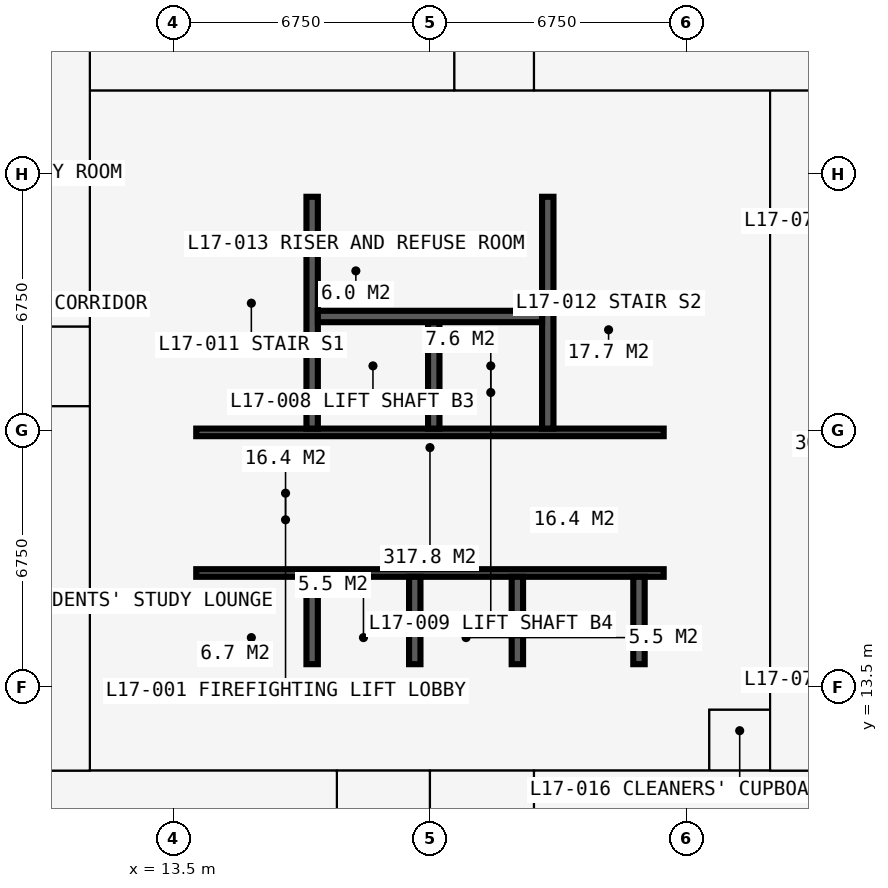
"""IFC4 building model, lengths in metres.
Left out: names, types, materials, properties, quantities, classifications, styles, units other than length and angle.
Written with IfcOpenShell. Run it as: python <this file> out.ifc"""

import sys

from ifc_helpers import new_model, si_unit, direction, frame, frame_2d, origin, place, context, subcontext, project, spatial, rectangle, extrude, element, fill, save


model = new_model("IFC4")
c1 = context("Model", 3, precision=1e-05, world=origin(), true_north=direction((0.0, 1.0)))
c2 = subcontext(c1, "Body", "Model", "MODEL_VIEW")
j1 = project(units=[si_unit("LENGTHUNIT", "METRE"), si_unit("PLANEANGLEUNIT", "RADIAN")], contexts=[c1])
p1 = place(None, origin())
s1 = spatial("IfcSite", under=j1, at=p1, CompositionType="ELEMENT")
p2 = place(p1, origin())
s2 = spatial("IfcBuilding", under=s1, at=p2, CompositionType="ELEMENT")
p3 = place(p2, frame((0.0, 0.0, 64.8)))
s3 = spatial("IfcBuildingStorey", under=s2, at=p3, CompositionType="ELEMENT", Elevation=64.8)
p4 = place(p3, frame((12.9, 13.5, 0.0), z_axis=(0.0, 0.0, 1.0), x_axis=(1.0, 0.0, 0.0)))
e1 = element("IfcWall", 1, at=p4, inside=s3, PredefinedType="SHEAR", context=c2, shape_type="SweptSolid", body=[
    extrude(rectangle(XDim=14.7, YDim=1.2, at=frame_2d((7.35, 0.0))), origin(), (0.0, 0.0, 1.0), 3.6),
])
p5 = place(p3, frame((27.0, 14.1, 0.0), z_axis=(0.0, 0.0, 1.0), x_axis=(0.0, 1.0, 0.0)))
e2 = element("IfcWall", 2, at=p5, inside=s3, PredefinedType="SHEAR", context=c2, shape_type="SweptSolid", body=[
    extrude(rectangle(XDim=12.3, YDim=1.2, at=frame_2d((6.15, 0.0))), origin(), (0.0, 0.0, 1.0), 3.6),
])
p6 = place(p5, frame((3.65, 0.0, 0.0)))
e3 = element("IfcOpeningElement", 3, at=p6, cuts=e2, PredefinedType="OPENING", context=c2, shape_type="SweptSolid", body=[
    extrude(rectangle(XDim=1.2, YDim=2.2, at=frame_2d((0.6, 1.1))), frame((0.0, 0.61, 0.0), z_axis=(0.0, -1.0, 0.0), x_axis=(1.0, 0.0, 0.0)), (0.0, 0.0, 1.0), 1.22),
])
p7 = place(p3, frame((27.6, 27.0, 0.0), z_axis=(0.0, 0.0, 1.0), x_axis=(-1.0, 0.0, 0.0)))
e4 = element("IfcWall", 4, at=p7, inside=s3, PredefinedType="SHEAR", context=c2, shape_type="SweptSolid", body=[
    extrude(rectangle(XDim=14.7, YDim=1.2, at=frame_2d((7.35, 0.0))), origin(), (0.0, 0.0, 1.0), 3.6),
])
p8 = place(p7, frame((5.225, 0.0, 0.0)))
e5 = element("IfcOpeningElement", 5, at=p8, cuts=e4, PredefinedType="OPENING", context=c2, shape_type="SweptSolid", body=[
    extrude(rectangle(XDim=0.9, YDim=2.2, at=frame_2d((0.45, 1.1))), frame((0.0, 0.61, 0.0), z_axis=(0.0, -1.0, 0.0), x_axis=(1.0, 0.0, 0.0)), (0.0, 0.0, 1.0), 1.22),
])
p9 = place(p7, frame((8.2, 0.0, 0.0)))
e6 = element("IfcOpeningElement", 6, at=p9, cuts=e4, PredefinedType="OPENING", context=c2, shape_type="SweptSolid", body=[
    extrude(rectangle(XDim=1.0, YDim=2.2, at=frame_2d((0.5, 1.1))), frame((0.0, 0.61, 0.0), z_axis=(0.0, -1.0, 0.0), x_axis=(1.0, 0.0, 0.0)), (0.0, 0.0, 1.0), 1.22),
])
p10 = place(p3, frame((13.5, 26.4, 0.0), z_axis=(0.0, 0.0, 1.0), x_axis=(0.0, -1.0, 0.0)))
e7 = element("IfcWall", 7, at=p10, inside=s3, PredefinedType="SHEAR", context=c2, shape_type="SweptSolid", body=[
    extrude(rectangle(XDim=12.3, YDim=1.2, at=frame_2d((6.15, 0.0))), origin(), (0.0, 0.0, 1.0), 3.6),
])
p11 = place(p10, frame((7.45, 0.0, 0.0)))
e8 = element("IfcOpeningElement", 8, at=p11, cuts=e7, PredefinedType="OPENING", context=c2, shape_type="SweptSolid", body=[
    extrude(rectangle(XDim=1.2, YDim=2.2, at=frame_2d((0.6, 1.1))), frame((0.0, 0.61, 0.0), z_axis=(0.0, -1.0, 0.0), x_axis=(1.0, 0.0, 0.0)), (0.0, 0.0, 1.0), 1.22),
])
p12 = place(p3, frame((14.1, 16.5, 0.0), z_axis=(0.0, 0.0, 1.0), x_axis=(1.0, 0.0, 0.0)))
e9 = element("IfcWall", 9, at=p12, inside=s3, PredefinedType="SHEAR", context=c2, shape_type="SweptSolid", body=[
    extrude(rectangle(XDim=12.3, YDim=0.2, at=frame_2d((6.15, 0.0))), origin(), (0.0, 0.0, 1.0), 3.6),
])
p13 = place(p12, frame((0.9, 0.0, 0.0)))
e10 = element("IfcOpeningElement", 10, at=p13, cuts=e9, PredefinedType="OPENING", context=c2, shape_type="SweptSolid", body=[
    extrude(rectangle(XDim=1.1, YDim=2.2, at=frame_2d((0.55, 1.1))), frame((0.0, 0.11, 0.0), z_axis=(0.0, -1.0, 0.0), x_axis=(1.0, 0.0, 0.0)), (0.0, 0.0, 1.0), 0.22),
])
p14 = place(p12, frame((9.5, 0.0, 0.0)))
e11 = element("IfcOpeningElement", 11, at=p14, cuts=e9, PredefinedType="OPENING", context=c2, shape_type="SweptSolid", body=[
    extrude(rectangle(XDim=1.1, YDim=2.2, at=frame_2d((0.55, 1.1))), frame((0.0, 0.11, 0.0), z_axis=(0.0, -1.0, 0.0), x_axis=(1.0, 0.0, 0.0)), (0.0, 0.0, 1.0), 0.22),
])
p15 = place(p3, frame((14.1, 20.2, 0.0), z_axis=(0.0, 0.0, 1.0), x_axis=(1.0, 0.0, 0.0)))
e12 = element("IfcWall", 12, at=p15, inside=s3, PredefinedType="SHEAR", context=c2, shape_type="SweptSolid", body=[
    extrude(rectangle(XDim=12.3, YDim=0.2, at=frame_2d((6.15, 0.0))), origin(), (0.0, 0.0, 1.0), 3.6),
])
p16 = place(p15, frame((0.35, 0.0, 0.0)))
e13 = element("IfcOpeningElement", 13, at=p16, cuts=e12, PredefinedType="OPENING", context=c2, shape_type="SweptSolid", body=[
    extrude(rectangle(XDim=1.1, YDim=2.2, at=frame_2d((0.55, 1.1))), frame((0.0, 0.11, 0.0), z_axis=(0.0, -1.0, 0.0), x_axis=(1.0, 0.0, 0.0)), (0.0, 0.0, 1.0), 0.22),
])
p17 = place(p15, frame((9.75, 0.0, 0.0)))
e14 = element("IfcOpeningElement", 14, at=p17, cuts=e12, PredefinedType="OPENING", context=c2, shape_type="SweptSolid", body=[
    extrude(rectangle(XDim=1.1, YDim=2.2, at=frame_2d((0.55, 1.1))), frame((0.0, 0.11, 0.0), z_axis=(0.0, -1.0, 0.0), x_axis=(1.0, 0.0, 0.0)), (0.0, 0.0, 1.0), 0.22),
])
for number, where, z_axis, x_axis in (
    (15, (17.15, 20.3, 0.0), (0.0, 0.0, 1.0), (0.0, 1.0, 0.0)),
    (16, (23.35, 20.3, 0.0), (0.0, 0.0, 1.0), (0.0, 1.0, 0.0)),
):
    element("IfcWall", number, at=place(p3, frame(where, z_axis=z_axis, x_axis=x_axis)), inside=s3, PredefinedType="SHEAR", context=c2, shape_type="SweptSolid", body=[
        extrude(rectangle(XDim=6.1, YDim=0.3, at=frame_2d((3.05, 0.0))), origin(), (0.0, 0.0, 1.0), 3.6),
    ])
p18 = place(p3, frame((20.35, 20.3, 0.0), z_axis=(0.0, 0.0, 1.0), x_axis=(0.0, 1.0, 0.0)))
e17 = element("IfcWall", 17, at=p18, inside=s3, PredefinedType="SHEAR", context=c2, shape_type="SweptSolid", body=[
    extrude(rectangle(XDim=2.8, YDim=0.3, at=frame_2d((1.4, 0.0))), origin(), (0.0, 0.0, 1.0), 3.6),
])
p19 = place(p3, frame((17.3, 23.25, 0.0), z_axis=(0.0, 0.0, 1.0), x_axis=(1.0, 0.0, 0.0)))
e18 = element("IfcWall", 18, at=p19, inside=s3, PredefinedType="SHEAR", context=c2, shape_type="SweptSolid", body=[
    extrude(rectangle(XDim=5.9, YDim=0.3, at=frame_2d((2.95, 0.0))), origin(), (0.0, 0.0, 1.0), 3.6),
])
for number, where, z_axis, x_axis in (
    (19, (17.15, 14.1, 0.0), (0.0, 0.0, 1.0), (0.0, 1.0, 0.0)),
    (20, (19.85, 14.1, 0.0), (0.0, 0.0, 1.0), (0.0, 1.0, 0.0)),
    (21, (22.55, 14.1, 0.0), (0.0, 0.0, 1.0), (0.0, 1.0, 0.0)),
    (22, (25.75, 14.1, 0.0), (0.0, 0.0, 1.0), (0.0, 1.0, 0.0)),
):
    element("IfcWall", number, at=place(p3, frame(where, z_axis=z_axis, x_axis=x_axis)), inside=s3, PredefinedType="SHEAR", context=c2, shape_type="SweptSolid", body=[
        extrude(rectangle(XDim=2.3, YDim=0.3, at=frame_2d((1.15, 0.0))), origin(), (0.0, 0.0, 1.0), 3.6),
    ])
p20 = place(p3, frame((18.875, 16.6, 0.0), z_axis=(0.0, 0.0, 1.0), x_axis=(0.0, 1.0, 0.0)))
e23 = element("IfcWall", 23, at=p20, inside=s3, PredefinedType="PARTITIONING", context=c2, shape_type="SweptSolid", body=[
    extrude(rectangle(XDim=3.5, YDim=0.15, at=frame_2d((1.75, 0.0))), origin(), (0.0, 0.0, 1.0), 3.375),
])
p21 = place(p20, frame((1.15, 0.0, 0.0)))
e24 = element("IfcOpeningElement", 24, at=p21, cuts=e23, PredefinedType="OPENING", context=c2, shape_type="SweptSolid", body=[
    extrude(rectangle(XDim=1.2, YDim=2.2, at=frame_2d((0.6, 1.1))), frame((0.0, 0.085, 0.0), z_axis=(0.0, -1.0, 0.0), x_axis=(1.0, 0.0, 0.0)), (0.0, 0.0, 1.0), 0.17),
])
p22 = place(p3, frame((21.625, 16.6, 0.0), z_axis=(0.0, 0.0, 1.0), x_axis=(0.0, 1.0, 0.0)))
e25 = element("IfcWall", 25, at=p22, inside=s3, PredefinedType="PARTITIONING", context=c2, shape_type="SweptSolid", body=[
    extrude(rectangle(XDim=3.5, YDim=0.15, at=frame_2d((1.75, 0.0))), origin(), (0.0, 0.0, 1.0), 3.375),
])
p23 = place(p22, frame((1.15, 0.0, 0.0)))
e26 = element("IfcOpeningElement", 26, at=p23, cuts=e25, PredefinedType="OPENING", context=c2, shape_type="SweptSolid", body=[
    extrude(rectangle(XDim=1.2, YDim=2.2, at=frame_2d((0.6, 1.1))), frame((0.0, 0.085, 0.0), z_axis=(0.0, -1.0, 0.0), x_axis=(1.0, 0.0, 0.0)), (0.0, 0.0, 1.0), 0.17),
])
p24 = place(p3, frame((19.375, 23.4, 0.0), z_axis=(0.0, 0.0, 1.0), x_axis=(0.0, 1.0, 0.0)))
e27 = element("IfcWall", 27, at=p24, inside=s3, PredefinedType="PARTITIONING", context=c2, shape_type="SweptSolid", body=[
    extrude(rectangle(XDim=3.0, YDim=0.15, at=frame_2d((1.5, 0.0))), origin(), (0.0, 0.0, 1.0), 3.375),
])
for number, where, z_axis, x_axis in (
    (28, (5.65, 20.887, 0.0), (0.0, 0.0, 1.0), (1.0, 0.0, 0.0)),
    (29, (5.65, 22.988, 0.0), (0.0, 0.0, 1.0), (1.0, 0.0, 0.0)),
):
    element("IfcWall", number, at=place(p3, frame(where, z_axis=z_axis, x_axis=x_axis)), inside=s3, PredefinedType="PARTITIONING", context=c2, shape_type="SweptSolid", body=[
        extrude(rectangle(XDim=5.65, YDim=0.15, at=frame_2d((2.825, 0.0))), origin(), (0.0, 0.0, 1.0), 3.375),
    ])
p25 = place(p3, frame((10.125, 11.3, 0.0), z_axis=(0.0, 0.0, 1.0), x_axis=(1.0, 0.0, 0.0)))
e30 = element("IfcWall", 30, at=p25, inside=s3, PredefinedType="PARTITIONING", context=c2, shape_type="SweptSolid", body=[
    extrude(rectangle(XDim=20.675, YDim=0.15, at=frame_2d((10.337, 0.0))), origin(), (0.0, 0.0, 1.0), 3.375),
])
p26 = place(p25, frame((8.375, 0.0, 0.0)))
e31 = element("IfcOpeningElement", 31, at=p26, cuts=e30, PredefinedType="OPENING", context=c2, shape_type="SweptSolid", body=[
    extrude(rectangle(XDim=1.0, YDim=2.2, at=frame_2d((0.5, 1.1))), frame((0.0, 0.085, 0.0), z_axis=(0.0, -1.0, 0.0), x_axis=(1.0, 0.0, 0.0)), (0.0, 0.0, 1.0), 0.17),
])
p27 = place(p25, frame((10.975, 0.0, 0.0)))
e32 = element("IfcOpeningElement", 32, at=p27, cuts=e30, PredefinedType="OPENING", context=c2, shape_type="SweptSolid", body=[
    extrude(rectangle(XDim=1.0, YDim=2.2, at=frame_2d((0.5, 1.1))), frame((0.0, 0.085, 0.0), z_axis=(0.0, -1.0, 0.0), x_axis=(1.0, 0.0, 0.0)), (0.0, 0.0, 1.0), 0.17),
])
p28 = place(p25, frame((3.925, 0.0, 0.0)))
e33 = element("IfcOpeningElement", 33, at=p28, cuts=e30, PredefinedType="OPENING", context=c2, shape_type="SweptSolid", body=[
    extrude(rectangle(XDim=0.95, YDim=2.2, at=frame_2d((0.475, 1.1))), frame((0.0, 0.085, 0.0), z_axis=(0.0, -1.0, 0.0), x_axis=(1.0, 0.0, 0.0)), (0.0, 0.0, 1.0), 0.17),
])
p29 = place(p3, frame((11.3, 11.3, 0.0), z_axis=(0.0, 0.0, 1.0), x_axis=(0.0, 1.0, 0.0)))
e34 = element("IfcWall", 34, at=p29, inside=s3, PredefinedType="PARTITIONING", context=c2, shape_type="SweptSolid", body=[
    extrude(rectangle(XDim=19.075, YDim=0.15, at=frame_2d((9.538, 0.0))), origin(), (0.0, 0.0, 1.0), 3.375),
])
p30 = place(p29, frame((10.137, 0.0, 0.0)))
e35 = element("IfcOpeningElement", 35, at=p30, cuts=e34, PredefinedType="OPENING", context=c2, shape_type="SweptSolid", body=[
    extrude(rectangle(XDim=1.0, YDim=2.2, at=frame_2d((0.5, 1.1))), frame((0.0, 0.085, 0.0), z_axis=(0.0, -1.0, 0.0), x_axis=(1.0, 0.0, 0.0)), (0.0, 0.0, 1.0), 0.17),
])
p31 = place(p3, frame((11.3, 29.2, 0.0), z_axis=(0.0, 0.0, 1.0), x_axis=(1.0, 0.0, 0.0)))
e36 = element("IfcWall", 36, at=p31, inside=s3, PredefinedType="PARTITIONING", context=c2, shape_type="SweptSolid", body=[
    extrude(rectangle(XDim=19.075, YDim=0.15, at=frame_2d((9.538, 0.0))), origin(), (0.0, 0.0, 1.0), 3.375),
])
p32 = place(p31, frame((10.137, 0.0, 0.0)))
e37 = element("IfcOpeningElement", 37, at=p32, cuts=e36, PredefinedType="OPENING", context=c2, shape_type="SweptSolid", body=[
    extrude(rectangle(XDim=1.0, YDim=2.2, at=frame_2d((0.5, 1.1))), frame((0.0, 0.085, 0.0), z_axis=(0.0, -1.0, 0.0), x_axis=(1.0, 0.0, 0.0)), (0.0, 0.0, 1.0), 0.17),
])
p33 = place(p3, frame((17.8, 5.65, 0.0), z_axis=(0.0, 0.0, 1.0), x_axis=(0.0, 1.0, 0.0)))
e38 = element("IfcWall", 38, at=p33, inside=s3, PredefinedType="PARTITIONING", context=c2, shape_type="SweptSolid", body=[
    extrude(rectangle(XDim=5.65, YDim=0.15, at=frame_2d((2.825, 0.0))), origin(), (0.0, 0.0, 1.0), 3.375),
])
p34 = place(p3, frame((20.25, -0.734, 0.0), z_axis=(0.0, 0.0, 1.0), x_axis=(0.0, 1.0, 0.0)))
e39 = element("IfcWall", 39, at=p34, inside=s3, PredefinedType="PARTITIONING", context=c2, shape_type="SweptSolid", body=[
    extrude(rectangle(XDim=12.034, YDim=0.15, at=frame_2d((6.017, 0.0))), origin(), (0.0, 0.0, 1.0), 2.61),
])
for number, where, z_axis, x_axis in (
    (40, (20.887, 29.2, 0.0), (0.0, 0.0, 1.0), (0.0, 1.0, 0.0)),
    (41, (22.988, 5.65, 0.0), (0.0, 0.0, 1.0), (0.0, 1.0, 0.0)),
    (42, (22.988, 29.2, 0.0), (0.0, 0.0, 1.0), (0.0, 1.0, 0.0)),
):
    element("IfcWall", number, at=place(p3, frame(where, z_axis=z_axis, x_axis=x_axis)), inside=s3, PredefinedType="PARTITIONING", context=c2, shape_type="SweptSolid", body=[
        extrude(rectangle(XDim=5.65, YDim=0.15, at=frame_2d((2.825, 0.0))), origin(), (0.0, 0.0, 1.0), 3.375),
    ])
p35 = place(p3, frame((27.6, 11.3, 0.0), z_axis=(0.0, 0.0, 1.0), x_axis=(0.0, 1.0, 0.0)))
e43 = element("IfcWall", 43, at=p35, inside=s3, PredefinedType="PARTITIONING", context=c2, shape_type="SweptSolid", body=[
    extrude(rectangle(XDim=1.6, YDim=0.15, at=frame_2d((0.8, 0.0))), origin(), (0.0, 0.0, 1.0), 3.375),
])
p36 = place(p35, frame((0.3, 0.0, 0.0)))
e44 = element("IfcOpeningElement", 44, at=p36, cuts=e43, PredefinedType="OPENING", context=c2, shape_type="SweptSolid", body=[
    extrude(rectangle(XDim=0.95, YDim=2.2, at=frame_2d((0.475, 1.1))), frame((0.0, 0.085, 0.0), z_axis=(0.0, -1.0, 0.0), x_axis=(1.0, 0.0, 0.0)), (0.0, 0.0, 1.0), 0.17),
])
p37 = place(p3, frame((27.6, 12.9, 0.0), z_axis=(0.0, 0.0, 1.0), x_axis=(1.0, 0.0, 0.0)))
e45 = element("IfcWall", 45, at=p37, inside=s3, PredefinedType="PARTITIONING", context=c2, shape_type="SweptSolid", body=[
    extrude(rectangle(XDim=1.6, YDim=0.15, at=frame_2d((0.8, 0.0))), origin(), (0.0, 0.0, 1.0), 2.877),
])
p38 = place(p3, frame((29.2, 11.3, 0.0), z_axis=(0.0, 0.0, 1.0), x_axis=(0.0, 1.0, 0.0)))
e46 = element("IfcWall", 46, at=p38, inside=s3, PredefinedType="PARTITIONING", context=c2, shape_type="SweptSolid", body=[
    extrude(rectangle(XDim=17.9, YDim=0.2, at=frame_2d((8.95, 0.0))), origin(), (0.0, 0.0, 1.0), 3.375),
])
p39 = place(p38, frame((8.35, 0.0, 0.0)))
e47 = element("IfcOpeningElement", 47, at=p39, cuts=e46, PredefinedType="OPENING", context=c2, shape_type="SweptSolid", body=[
    extrude(rectangle(XDim=1.2, YDim=2.2, at=frame_2d((0.6, 1.1))), frame((0.0, 0.11, 0.0), z_axis=(0.0, -1.0, 0.0), x_axis=(1.0, 0.0, 0.0)), (0.0, 0.0, 1.0), 0.22),
])
p40 = place(p3, frame((29.2, 25.7, 0.0), z_axis=(0.0, 0.0, 1.0), x_axis=(1.0, 0.0, 0.0)))
e48 = element("IfcWall", 48, at=p40, inside=s3, PredefinedType="SHEAR", context=c2, shape_type="SweptSolid", body=[
    extrude(rectangle(XDim=3.45, YDim=0.1, at=frame_2d((1.725, 0.0))), origin(), (0.0, 0.0, 1.0), 3.375),
])
p41 = place(p13, origin())
e49 = element("IfcDoor", 49, at=p41, inside=s3, OperationType="DOUBLE_DOOR_SLIDING", PredefinedType="DOOR", context=c2, shape_type="SweptSolid", body=[
    extrude(rectangle(XDim=1.1, YDim=2.2, at=frame_2d((0.55, 1.1))), frame((0.0, 0.025, 0.0), z_axis=(0.0, -1.0, 0.0), x_axis=(1.0, 0.0, 0.0)), (0.0, 0.0, 1.0), 0.05),
])
fill(e10, e49)
p42 = place(p14, origin())
e50 = element("IfcDoor", 50, at=p42, inside=s3, OperationType="DOUBLE_DOOR_SLIDING", PredefinedType="DOOR", context=c2, shape_type="SweptSolid", body=[
    extrude(rectangle(XDim=1.1, YDim=2.2, at=frame_2d((0.55, 1.1))), frame((0.0, 0.025, 0.0), z_axis=(0.0, -1.0, 0.0), x_axis=(1.0, 0.0, 0.0)), (0.0, 0.0, 1.0), 0.05),
])
fill(e11, e50)
p43 = place(p11, origin())
e51 = element("IfcDoor", 51, at=p43, inside=s3, OperationType="DOUBLE_DOOR_SINGLE_SWING", PredefinedType="DOOR", context=c2, shape_type="SweptSolid", body=[
    extrude(rectangle(XDim=1.2, YDim=2.2, at=frame_2d((0.6, 1.1))), frame((0.0, 0.025, 0.0), z_axis=(0.0, -1.0, 0.0), x_axis=(1.0, 0.0, 0.0)), (0.0, 0.0, 1.0), 0.05),
])
fill(e8, e51)
p44 = place(p6, origin())
e52 = element("IfcDoor", 52, at=p44, inside=s3, OperationType="DOUBLE_DOOR_SINGLE_SWING", PredefinedType="DOOR", context=c2, shape_type="SweptSolid", body=[
    extrude(rectangle(XDim=1.2, YDim=2.2, at=frame_2d((0.6, 1.1))), frame((0.0, 0.025, 0.0), z_axis=(0.0, -1.0, 0.0), x_axis=(1.0, 0.0, 0.0)), (0.0, 0.0, 1.0), 0.05),
])
fill(e3, e52)
p45 = place(p21, origin())
e53 = element("IfcDoor", 53, at=p45, inside=s3, OperationType="DOUBLE_DOOR_SINGLE_SWING", PredefinedType="DOOR", context=c2, shape_type="SweptSolid", body=[
    extrude(rectangle(XDim=1.2, YDim=2.2, at=frame_2d((0.6, 1.1))), frame((0.0, 0.025, 0.0), z_axis=(0.0, -1.0, 0.0), x_axis=(1.0, 0.0, 0.0)), (0.0, 0.0, 1.0), 0.05),
])
fill(e24, e53)
p46 = place(p23, origin())
e54 = element("IfcDoor", 54, at=p46, inside=s3, OperationType="DOUBLE_DOOR_SINGLE_SWING", PredefinedType="DOOR", context=c2, shape_type="SweptSolid", body=[
    extrude(rectangle(XDim=1.2, YDim=2.2, at=frame_2d((0.6, 1.1))), frame((0.0, 0.025, 0.0), z_axis=(0.0, -1.0, 0.0), x_axis=(1.0, 0.0, 0.0)), (0.0, 0.0, 1.0), 0.05),
])
fill(e26, e54)
p47 = place(p8, origin())
e55 = element("IfcDoor", 55, at=p47, inside=s3, OperationType="SINGLE_SWING_LEFT", PredefinedType="DOOR", context=c2, shape_type="SweptSolid", body=[
    extrude(rectangle(XDim=0.9, YDim=2.2, at=frame_2d((0.45, 1.1))), frame((0.0, 0.4, 0.0), z_axis=(0.0, -1.0, 0.0), x_axis=(1.0, 0.0, 0.0)), (0.0, 0.0, 1.0), 0.8),
])
fill(e5, e55)
p48 = place(p9, origin())
e56 = element("IfcDoor", 56, at=p48, inside=s3, OperationType="SINGLE_SWING_LEFT", PredefinedType="DOOR", context=c2, shape_type="SweptSolid", body=[
    extrude(rectangle(XDim=1.0, YDim=2.2, at=frame_2d((0.5, 1.1))), frame((0.0, 0.025, 0.0), z_axis=(0.0, -1.0, 0.0), x_axis=(1.0, 0.0, 0.0)), (0.0, 0.0, 1.0), 0.05),
])
fill(e6, e56)
p49 = place(p16, origin())
e57 = element("IfcDoor", 57, at=p49, inside=s3, OperationType="SINGLE_SWING_LEFT", PredefinedType="DOOR", context=c2, shape_type="SweptSolid", body=[
    extrude(rectangle(XDim=1.1, YDim=2.2, at=frame_2d((0.55, 1.1))), frame((0.0, 0.025, 0.0), z_axis=(0.0, -1.0, 0.0), x_axis=(1.0, 0.0, 0.0)), (0.0, 0.0, 1.0), 0.05),
])
fill(e13, e57)
p50 = place(p17, origin())
e58 = element("IfcDoor", 58, at=p50, inside=s3, OperationType="SINGLE_SWING_LEFT", PredefinedType="DOOR", context=c2, shape_type="SweptSolid", body=[
    extrude(rectangle(XDim=1.1, YDim=2.2, at=frame_2d((0.55, 1.1))), frame((0.0, 0.025, 0.0), z_axis=(0.0, -1.0, 0.0), x_axis=(1.0, 0.0, 0.0)), (0.0, 0.0, 1.0), 0.05),
])
fill(e14, e58)
p51 = place(p36, origin())
e59 = element("IfcDoor", 59, at=p51, inside=s3, OperationType="SINGLE_SWING_LEFT", PredefinedType="DOOR", context=c2, shape_type="SweptSolid", body=[
    extrude(rectangle(XDim=0.95, YDim=2.2, at=frame_2d((0.475, 1.1))), frame((0.0, 0.025, 0.0), z_axis=(0.0, -1.0, 0.0), x_axis=(1.0, 0.0, 0.0)), (0.0, 0.0, 1.0), 0.05),
])
fill(e44, e59)
p52 = place(p26, origin())
e60 = element("IfcDoor", 60, at=p52, inside=s3, OperationType="SINGLE_SWING_LEFT", PredefinedType="DOOR", context=c2, shape_type="SweptSolid", body=[
    extrude(rectangle(XDim=1.0, YDim=2.2, at=frame_2d((0.5, 1.1))), frame((0.0, 0.025, 0.0), z_axis=(0.0, -1.0, 0.0), x_axis=(1.0, 0.0, 0.0)), (0.0, 0.0, 1.0), 0.05),
])
fill(e31, e60)
p53 = place(p27, origin())
e61 = element("IfcDoor", 61, at=p53, inside=s3, OperationType="SINGLE_SWING_LEFT", PredefinedType="DOOR", context=c2, shape_type="SweptSolid", body=[
    extrude(rectangle(XDim=1.0, YDim=2.2, at=frame_2d((0.5, 1.1))), frame((0.0, 0.025, 0.0), z_axis=(0.0, -1.0, 0.0), x_axis=(1.0, 0.0, 0.0)), (0.0, 0.0, 1.0), 0.05),
])
fill(e32, e61)
p54 = place(p28, origin())
e62 = element("IfcDoor", 62, at=p54, inside=s3, OperationType="SINGLE_SWING_LEFT", PredefinedType="DOOR", context=c2, shape_type="SweptSolid", body=[
    extrude(rectangle(XDim=0.95, YDim=2.2, at=frame_2d((0.475, 1.1))), frame((0.0, 0.025, 0.0), z_axis=(0.0, -1.0, 0.0), x_axis=(1.0, 0.0, 0.0)), (0.0, 0.0, 1.0), 0.05),
])
fill(e33, e62)
p55 = place(p32, origin())
e63 = element("IfcDoor", 63, at=p55, inside=s3, OperationType="SINGLE_SWING_LEFT", PredefinedType="DOOR", context=c2, shape_type="SweptSolid", body=[
    extrude(rectangle(XDim=1.0, YDim=2.2, at=frame_2d((0.5, 1.1))), frame((0.0, 0.025, 0.0), z_axis=(0.0, -1.0, 0.0), x_axis=(1.0, 0.0, 0.0)), (0.0, 0.0, 1.0), 0.05),
])
fill(e37, e63)
p56 = place(p30, origin())
e64 = element("IfcDoor", 64, at=p56, inside=s3, OperationType="SINGLE_SWING_LEFT", PredefinedType="DOOR", context=c2, shape_type="SweptSolid", body=[
    extrude(rectangle(XDim=1.0, YDim=2.2, at=frame_2d((0.5, 1.1))), frame((0.0, 0.025, 0.0), z_axis=(0.0, -1.0, 0.0), x_axis=(1.0, 0.0, 0.0)), (0.0, 0.0, 1.0), 0.05),
])
fill(e35, e64)
p57 = place(p39, origin())
e65 = element("IfcDoor", 65, at=p57, inside=s3, OperationType="DOUBLE_DOOR_SINGLE_SWING", PredefinedType="DOOR", context=c2, shape_type="SweptSolid", body=[
    extrude(rectangle(XDim=1.2, YDim=2.2, at=frame_2d((0.6, 1.1))), frame((0.0, 0.025, 0.0), z_axis=(0.0, -1.0, 0.0), x_axis=(1.0, 0.0, 0.0)), (0.0, 0.0, 1.0), 0.05),
])
fill(e47, e65)
save(model, sys.argv[1])
